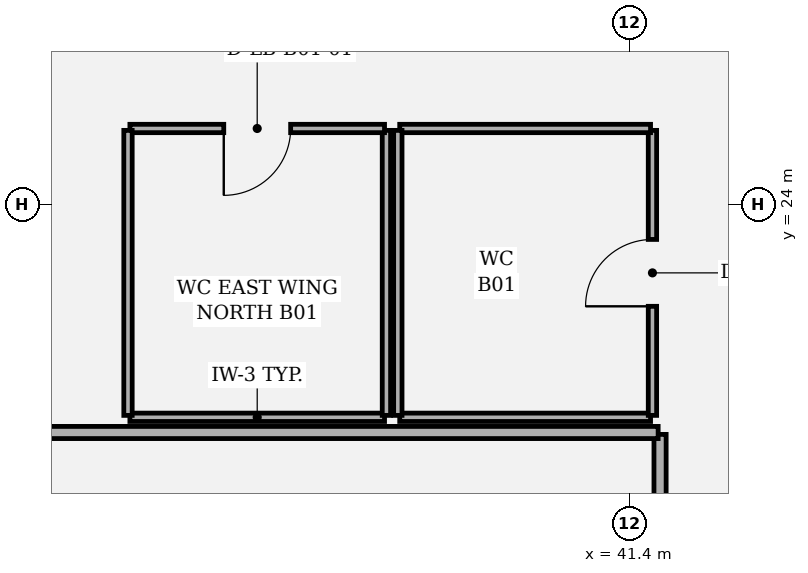
"""IFC4 building model, lengths in metres.
Left out: names, types, materials, properties, quantities, classifications, styles, units other than length and angle.
Written with IfcOpenShell. Run it as: python <this file> out.ifc"""

import sys

from ifc_helpers import new_model, si_unit, direction, frame, frame_2d, origin, place, context, subcontext, project, spatial, rectangle, extrude, element, fill, save


model = new_model("IFC4")
c1 = context("Model", 3, precision=1e-05, world=origin(), true_north=direction((0.0, 1.0)))
c2 = subcontext(c1, "Body", "Model", "MODEL_VIEW")
j1 = project(units=[si_unit("LENGTHUNIT", "METRE"), si_unit("PLANEANGLEUNIT", "RADIAN")], contexts=[c1])
p1 = place(None, origin())
s1 = spatial("IfcSite", under=j1, at=p1, CompositionType="ELEMENT")
p2 = place(p1, origin())
s2 = spatial("IfcBuilding", under=s1, at=p2, CompositionType="ELEMENT")
p3 = place(p2, frame((0.0, 0.0, -5.4)))
s3 = spatial("IfcBuildingStorey", under=s2, at=p3, CompositionType="ELEMENT", Elevation=-5.4)
p4 = place(p3, frame((34.825, 21.2, 0.0), z_axis=(0.0, 0.0, 1.0), x_axis=(1.0, 0.0, 0.0)))
e1 = element("IfcWall", 1, at=p4, inside=s3, PredefinedType="PARTITIONING", context=c2, shape_type="SweptSolid", body=[
    extrude(rectangle(XDim=3.35, YDim=0.11, at=frame_2d((1.675, 0.0))), origin(), (0.0, 0.0, 1.0), 5.1),
])
p5 = place(p3, frame((38.2, 21.225, 0.0), z_axis=(0.0, 0.0, 1.0), x_axis=(0.0, 1.0, 0.0)))
e2 = element("IfcWall", 2, at=p5, inside=s3, PredefinedType="PARTITIONING", context=c2, shape_type="SweptSolid", body=[
    extrude(rectangle(XDim=3.75, YDim=0.11, at=frame_2d((1.875, 0.0))), origin(), (0.0, 0.0, 1.0), 5.1),
])
p6 = place(p3, frame((38.175, 25.0, 0.0), z_axis=(0.0, 0.0, 1.0), x_axis=(-1.0, 0.0, 0.0)))
e3 = element("IfcWall", 3, at=p6, inside=s3, PredefinedType="PARTITIONING", context=c2, shape_type="SweptSolid", body=[
    extrude(rectangle(XDim=3.35, YDim=0.11, at=frame_2d((1.675, 0.0))), origin(), (0.0, 0.0, 1.0), 5.1),
])
p7 = place(p6, frame((1.235, 0.0, 0.0)))
e4 = element("IfcOpeningElement", 4, at=p7, cuts=e3, PredefinedType="OPENING", context=c2, shape_type="SweptSolid", body=[
    extrude(rectangle(XDim=0.88, YDim=2.1, at=frame_2d((0.44, 1.05))), frame((0.0, 0.065, 0.0), z_axis=(0.0, -1.0, 0.0), x_axis=(1.0, 0.0, 0.0)), (0.0, 0.0, 1.0), 0.13),
])
p8 = place(p3, frame((34.8, 24.975, 0.0), z_axis=(0.0, 0.0, 1.0), x_axis=(0.0, -1.0, 0.0)))
e5 = element("IfcWall", 5, at=p8, inside=s3, PredefinedType="PARTITIONING", context=c2, shape_type="SweptSolid", body=[
    extrude(rectangle(XDim=3.75, YDim=0.11, at=frame_2d((1.875, 0.0))), origin(), (0.0, 0.0, 1.0), 5.1),
])
p9 = place(p3, frame((38.375, 21.2, 0.0), z_axis=(0.0, 0.0, 1.0), x_axis=(1.0, 0.0, 0.0)))
e6 = element("IfcWall", 6, at=p9, inside=s3, PredefinedType="PARTITIONING", context=c2, shape_type="SweptSolid", body=[
    extrude(rectangle(XDim=3.3, YDim=0.11, at=frame_2d((1.65, 0.0))), origin(), (0.0, 0.0, 1.0), 5.1),
])
p10 = place(p3, frame((41.7, 21.225, 0.0), z_axis=(0.0, 0.0, 1.0), x_axis=(0.0, 1.0, 0.0)))
e7 = element("IfcWall", 7, at=p10, inside=s3, PredefinedType="PARTITIONING", context=c2, shape_type="SweptSolid", body=[
    extrude(rectangle(XDim=3.75, YDim=0.11, at=frame_2d((1.875, 0.0))), origin(), (0.0, 0.0, 1.0), 4.454),
])
p11 = place(p10, frame((1.435, 0.0, 0.0)))
e8 = element("IfcOpeningElement", 8, at=p11, cuts=e7, PredefinedType="OPENING", context=c2, shape_type="SweptSolid", body=[
    extrude(rectangle(XDim=0.88, YDim=2.1, at=frame_2d((0.44, 1.05))), frame((0.0, 0.065, 0.0), z_axis=(0.0, -1.0, 0.0), x_axis=(1.0, 0.0, 0.0)), (0.0, 0.0, 1.0), 0.13),
])
p12 = place(p3, frame((41.675, 25.0, 0.0), z_axis=(0.0, 0.0, 1.0), x_axis=(-1.0, 0.0, 0.0)))
e9 = element("IfcWall", 9, at=p12, inside=s3, PredefinedType="PARTITIONING", context=c2, shape_type="SweptSolid", body=[
    extrude(rectangle(XDim=3.3, YDim=0.11, at=frame_2d((1.65, 0.0))), origin(), (0.0, 0.0, 1.0), 5.1),
])
p13 = place(p3, frame((38.35, 24.975, 0.0), z_axis=(0.0, 0.0, 1.0), x_axis=(0.0, -1.0, 0.0)))
e10 = element("IfcWall", 10, at=p13, inside=s3, PredefinedType="PARTITIONING", context=c2, shape_type="SweptSolid", body=[
    extrude(rectangle(XDim=3.75, YDim=0.11, at=frame_2d((1.875, 0.0))), origin(), (0.0, 0.0, 1.0), 5.1),
])
p14 = place(p3, frame((41.8, 19.875, 0.0), z_axis=(0.0, 0.0, 1.0), x_axis=(0.0, 1.0, 0.0)))
e11 = element("IfcWall", 11, at=p14, inside=s3, PredefinedType="PARTITIONING", context=c2, shape_type="SweptSolid", body=[
    extrude(rectangle(XDim=1.1, YDim=0.16, at=frame_2d((0.55, 0.0))), origin(), (0.0, 0.0, 1.0), 5.1),
])
p15 = place(p3, frame((41.775, 21.0, 0.0), z_axis=(0.0, 0.0, 1.0), x_axis=(-1.0, 0.0, 0.0)))
e12 = element("IfcWall", 12, at=p15, inside=s3, PredefinedType="PARTITIONING", context=c2, shape_type="SweptSolid", body=[
    extrude(rectangle(XDim=9.295, YDim=0.16, at=frame_2d((4.647, 0.0))), origin(), (0.0, 0.0, 1.0), 5.1),
])
p16 = place(p7, origin())
e13 = element("IfcDoor", 13, at=p16, inside=s3, OperationType="SINGLE_SWING_RIGHT", PredefinedType="DOOR", context=c2, shape_type="SweptSolid", body=[
    extrude(rectangle(XDim=0.88, YDim=2.1, at=frame_2d((0.44, 1.05))), frame((0.0, 0.025, 0.0), z_axis=(0.0, -1.0, 0.0), x_axis=(1.0, 0.0, 0.0)), (0.0, 0.0, 1.0), 0.05),
])
fill(e4, e13)
p17 = place(p11, origin())
e14 = element("IfcDoor", 14, at=p17, inside=s3, OperationType="SINGLE_SWING_LEFT", PredefinedType="DOOR", context=c2, shape_type="SweptSolid", body=[
    extrude(rectangle(XDim=0.88, YDim=2.1, at=frame_2d((0.44, 1.05))), frame((0.0, 0.025, 0.0), z_axis=(0.0, -1.0, 0.0), x_axis=(1.0, 0.0, 0.0)), (0.0, 0.0, 1.0), 0.05),
])
fill(e8, e14)
save(model, sys.argv[1])
